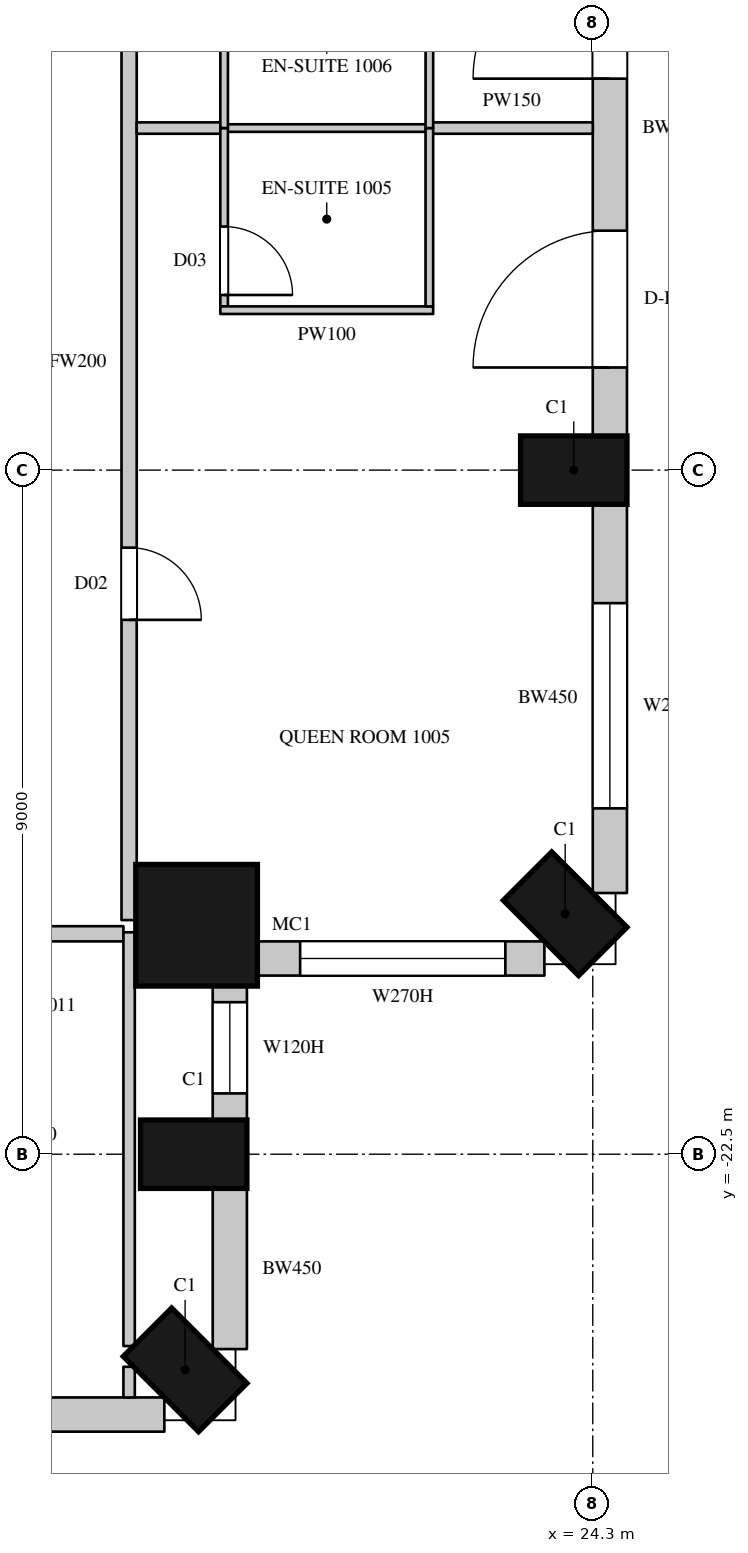
"""IFC4 building model, lengths in metres.
Left out: names, types, materials, properties, quantities, classifications, styles, units other than length and angle.
Written with IfcOpenShell. Run it as: python <this file> out.ifc"""

import sys

from ifc_helpers import new_model, si_unit, direction, frame, frame_2d, origin, origin_2d, place, context, subcontext, project, spatial, rectangle, circle, extrude, element, fill, save


model = new_model("IFC4")
c1 = context("Model", 3, precision=1e-05, world=origin(), true_north=direction((0.0, 1.0)))
c2 = subcontext(c1, "Body", "Model", "MODEL_VIEW")
j1 = project(units=[si_unit("LENGTHUNIT", "METRE"), si_unit("PLANEANGLEUNIT", "RADIAN")], contexts=[c1])
p1 = place(None, origin())
s1 = spatial("IfcSite", under=j1, at=p1, CompositionType="ELEMENT")
p2 = place(p1, origin())
s2 = spatial("IfcBuilding", under=s1, at=p2, CompositionType="ELEMENT")
p3 = place(p2, frame((0.0, 0.0, 66.3)))
s3 = spatial("IfcBuildingStorey", under=s2, at=p3, CompositionType="ELEMENT", Elevation=66.3)
for number, where, z_axis, x_axis in (
    (1, (18.937, -25.337, 0.0), (0.0, 0.0, 1.0), (0.707, 0.707, 0.0)),
    (2, (19.05, -22.5, 0.0), (0.0, 0.0, 1.0), (0.0, 1.0, 0.0)),
):
    element("IfcColumn", number, at=place(p3, frame(where, z_axis=z_axis, x_axis=x_axis)), inside=s3, PredefinedType="COLUMN", context=c2, shape_type="SweptSolid", body=[
        extrude(rectangle(XDim=0.9, YDim=1.4, at=origin_2d()), origin(), (0.0, 0.0, 1.0), 3.6),
    ])
p4 = place(p3, frame((19.088, -19.488, 0.0), z_axis=(0.0, 0.0, 1.0), x_axis=(1.0, 0.0, 0.0)))
e3 = element("IfcColumn", 3, at=p4, inside=s3, PredefinedType="COLUMN", context=c2, shape_type="SweptSolid", body=[
    extrude(circle(Radius=0.8, at=origin_2d()), origin(), (0.0, 0.0, 1.0), 3.6),
])
for number, where, z_axis, x_axis in (
    (4, (23.937, -19.337, 0.0), (0.0, 0.0, 1.0), (0.707, 0.707, 0.0)),
    (5, (24.05, -13.5, 0.0), (0.0, 0.0, 1.0), (0.0, 1.0, 0.0)),
):
    element("IfcColumn", number, at=place(p3, frame(where, z_axis=z_axis, x_axis=x_axis)), inside=s3, PredefinedType="COLUMN", context=c2, shape_type="SweptSolid", body=[
        extrude(rectangle(XDim=0.9, YDim=1.4, at=origin_2d()), origin(), (0.0, 0.0, 1.0), 3.6),
    ])
p5 = place(p3, frame((15.75, -25.925, 0.0), z_axis=(0.0, 0.0, 1.0), x_axis=(1.0, 0.0, 0.0)))
e6 = element("IfcWall", 6, at=p5, inside=s3, PredefinedType="SOLIDWALL", context=c2, shape_type="SweptSolid", body=[
    extrude(rectangle(XDim=2.914, YDim=0.45, at=frame_2d((1.457, 0.0))), origin(), (0.0, 0.0, 1.0), 3.3),
])
p6 = place(p3, frame((19.525, -25.064, 0.0), z_axis=(0.0, 0.0, 1.0), x_axis=(0.0, 1.0, 0.0)))
e7 = element("IfcWall", 7, at=p6, inside=s3, PredefinedType="SOLIDWALL", context=c2, shape_type="SweptSolid", body=[
    extrude(rectangle(XDim=2.114, YDim=0.45, at=frame_2d((1.057, 0.0))), origin(), (0.0, 0.0, 1.0), 3.3),
])
p7 = place(p3, frame((19.525, -22.05, 0.0), z_axis=(0.0, 0.0, 1.0), x_axis=(0.0, 1.0, 0.0)))
e8 = element("IfcWall", 8, at=p7, inside=s3, PredefinedType="SOLIDWALL", context=c2, shape_type="SweptSolid", body=[
    extrude(rectangle(XDim=1.792, YDim=0.45, at=frame_2d((0.896, 0.0))), origin(), (0.0, 0.0, 1.0), 3.3),
])
p8 = place(p7, frame((0.35, 0.0, 1.05)))
e9 = element("IfcOpeningElement", 9, at=p8, cuts=e8, PredefinedType="OPENING", context=c2, shape_type="SweptSolid", body=[
    extrude(rectangle(XDim=1.2, YDim=2.0, at=frame_2d((0.6, 1.0))), frame((0.0, 0.235, 0.0), z_axis=(0.0, -1.0, 0.0), x_axis=(1.0, 0.0, 0.0)), (0.0, 0.0, 1.0), 0.47),
])
p9 = place(p3, frame((19.858, -19.925, 0.0), z_axis=(0.0, 0.0, 1.0), x_axis=(1.0, 0.0, 0.0)))
e10 = element("IfcWall", 10, at=p9, inside=s3, PredefinedType="SOLIDWALL", context=c2, shape_type="SweptSolid", body=[
    extrude(rectangle(XDim=3.805, YDim=0.45, at=frame_2d((1.903, 0.0))), origin(), (0.0, 0.0, 1.0), 3.3),
])
p10 = place(p9, frame((0.592, 0.0, 1.05)))
e11 = element("IfcOpeningElement", 11, at=p10, cuts=e10, PredefinedType="OPENING", context=c2, shape_type="SweptSolid", body=[
    extrude(rectangle(XDim=2.7, YDim=2.0, at=frame_2d((1.35, 1.0))), frame((0.0, 0.235, 0.0), z_axis=(0.0, -1.0, 0.0), x_axis=(1.0, 0.0, 0.0)), (0.0, 0.0, 1.0), 0.47),
])
p11 = place(p3, frame((24.525, -19.064, 0.0), z_axis=(0.0, 0.0, 1.0), x_axis=(0.0, 1.0, 0.0)))
e12 = element("IfcWall", 12, at=p11, inside=s3, PredefinedType="SOLIDWALL", context=c2, shape_type="SweptSolid", body=[
    extrude(rectangle(XDim=5.114, YDim=0.45, at=frame_2d((2.557, 0.0))), origin(), (0.0, 0.0, 1.0), 3.3),
])
p12 = place(p11, frame((1.114, 0.0, 1.05)))
e13 = element("IfcOpeningElement", 13, at=p12, cuts=e12, PredefinedType="OPENING", context=c2, shape_type="SweptSolid", body=[
    extrude(rectangle(XDim=2.7, YDim=2.0, at=frame_2d((1.35, 1.0))), frame((0.0, 0.235, 0.0), z_axis=(0.0, -1.0, 0.0), x_axis=(1.0, 0.0, 0.0)), (0.0, 0.0, 1.0), 0.47),
])
p13 = place(p3, frame((24.525, -13.05, 0.0), z_axis=(0.0, 0.0, 1.0), x_axis=(0.0, 1.0, 0.0)))
e14 = element("IfcWall", 14, at=p13, inside=s3, PredefinedType="SOLIDWALL", context=c2, shape_type="SweptSolid", body=[
    extrude(rectangle(XDim=8.1, YDim=0.45, at=frame_2d((4.05, 0.0))), origin(), (0.0, 0.0, 1.0), 3.3),
])
p14 = place(p13, frame((0.9, 0.0, 0.0)))
e15 = element("IfcOpeningElement", 15, at=p14, cuts=e14, PredefinedType="OPENING", context=c2, shape_type="SweptSolid", body=[
    extrude(rectangle(XDim=1.8, YDim=2.4, at=frame_2d((0.9, 1.2))), frame((0.0, 0.235, 0.0), z_axis=(0.0, -1.0, 0.0), x_axis=(1.0, 0.0, 0.0)), (0.0, 0.0, 1.0), 0.47),
])
p15 = place(p13, frame((4.7, 0.0, 0.0)))
e16 = element("IfcOpeningElement", 16, at=p15, cuts=e14, PredefinedType="OPENING", context=c2, shape_type="SweptSolid", body=[
    extrude(rectangle(XDim=1.8, YDim=2.4, at=frame_2d((0.9, 1.2))), frame((0.0, 0.235, 0.0), z_axis=(0.0, -1.0, 0.0), x_axis=(1.0, 0.0, 0.0)), (0.0, 0.0, 1.0), 0.47),
])
p16 = place(p13, frame((6.7, 0.0, 1.05)))
e17 = element("IfcOpeningElement", 17, at=p16, cuts=e14, PredefinedType="OPENING", context=c2, shape_type="SweptSolid", body=[
    extrude(rectangle(XDim=1.2, YDim=2.0, at=frame_2d((0.6, 1.0))), frame((0.0, 0.235, 0.0), z_axis=(0.0, -1.0, 0.0), x_axis=(1.0, 0.0, 0.0)), (0.0, 0.0, 1.0), 0.47),
])
p17 = place(p3, frame((-20.7, -19.6, 0.0), z_axis=(0.0, 0.0, 1.0), x_axis=(1.0, 0.0, 0.0)))
e18 = element("IfcWall", 18, at=p17, inside=s3, PredefinedType="PARTITIONING", context=c2, shape_type="SweptSolid", body=[
    extrude(rectangle(XDim=38.825, YDim=0.2, at=frame_2d((19.413, 0.0))), origin(), (0.0, 0.0, 1.0), 3.3),
])
p18 = place(p17, frame((3.15, 0.0, 0.0)))
e19 = element("IfcOpeningElement", 19, at=p18, cuts=e18, PredefinedType="OPENING", context=c2, shape_type="SweptSolid", body=[
    extrude(rectangle(XDim=0.95, YDim=2.2, at=frame_2d((0.475, 1.1))), frame((0.0, 0.11, 0.0), z_axis=(0.0, -1.0, 0.0), x_axis=(1.0, 0.0, 0.0)), (0.0, 0.0, 1.0), 0.22),
])
p19 = place(p17, frame((13.9, 0.0, 0.0)))
e20 = element("IfcOpeningElement", 20, at=p19, cuts=e18, PredefinedType="OPENING", context=c2, shape_type="SweptSolid", body=[
    extrude(rectangle(XDim=0.95, YDim=2.2, at=frame_2d((0.475, 1.1))), frame((0.0, 0.11, 0.0), z_axis=(0.0, -1.0, 0.0), x_axis=(1.0, 0.0, 0.0)), (0.0, 0.0, 1.0), 0.22),
])
p20 = place(p17, frame((21.15, 0.0, 0.0)))
e21 = element("IfcOpeningElement", 21, at=p20, cuts=e18, PredefinedType="OPENING", context=c2, shape_type="SweptSolid", body=[
    extrude(rectangle(XDim=0.95, YDim=2.2, at=frame_2d((0.475, 1.1))), frame((0.0, 0.11, 0.0), z_axis=(0.0, -1.0, 0.0), x_axis=(1.0, 0.0, 0.0)), (0.0, 0.0, 1.0), 0.22),
])
p21 = place(p17, frame((29.75, 0.0, 0.0)))
e22 = element("IfcOpeningElement", 22, at=p21, cuts=e18, PredefinedType="OPENING", context=c2, shape_type="SweptSolid", body=[
    extrude(rectangle(XDim=1.1, YDim=2.4, at=frame_2d((0.55, 1.2))), frame((0.0, 0.11, 0.0), z_axis=(0.0, -1.0, 0.0), x_axis=(1.0, 0.0, 0.0)), (0.0, 0.0, 1.0), 0.22),
])
p22 = place(p3, frame((18.2, -19.42, 0.0), z_axis=(0.0, 0.0, 1.0), x_axis=(0.0, 1.0, 0.0)))
e23 = element("IfcWall", 23, at=p22, inside=s3, PredefinedType="PARTITIONING", context=c2, shape_type="SweptSolid", body=[
    extrude(rectangle(XDim=14.67, YDim=0.2, at=frame_2d((7.335, 0.0))), origin(), (0.0, 0.0, 1.0), 3.3),
])
p23 = place(p22, frame((3.95, 0.0, 0.0)))
e24 = element("IfcOpeningElement", 24, at=p23, cuts=e23, PredefinedType="OPENING", context=c2, shape_type="SweptSolid", body=[
    extrude(rectangle(XDim=0.95, YDim=2.2, at=frame_2d((0.475, 1.1))), frame((0.0, 0.11, 0.0), z_axis=(0.0, -1.0, 0.0), x_axis=(1.0, 0.0, 0.0)), (0.0, 0.0, 1.0), 0.22),
])
p24 = place(p22, frame((13.35, 0.0, 0.0)))
e25 = element("IfcOpeningElement", 25, at=p24, cuts=e23, PredefinedType="OPENING", context=c2, shape_type="SweptSolid", body=[
    extrude(rectangle(XDim=0.95, YDim=2.2, at=frame_2d((0.475, 1.1))), frame((0.0, 0.11, 0.0), z_axis=(0.0, -1.0, 0.0), x_axis=(1.0, 0.0, 0.0)), (0.0, 0.0, 1.0), 0.22),
])
p25 = place(p3, frame((18.2, -25.7, 0.0), z_axis=(0.0, 0.0, 1.0), x_axis=(0.0, 1.0, 0.0)))
e26 = element("IfcWall", 26, at=p25, inside=s3, PredefinedType="PARTITIONING", context=c2, shape_type="SweptSolid", body=[
    extrude(rectangle(XDim=0.404, YDim=0.15, at=frame_2d((0.202, 0.0))), origin(), (0.0, 0.0, 1.0), 3.3),
])
p26 = place(p3, frame((18.2, -25.024, 0.0), z_axis=(0.0, 0.0, 1.0), x_axis=(0.0, 1.0, 0.0)))
e27 = element("IfcWall", 27, at=p26, inside=s3, PredefinedType="PARTITIONING", context=c2, shape_type="SweptSolid", body=[
    extrude(rectangle(XDim=5.444, YDim=0.15, at=frame_2d((2.722, 0.0))), origin(), (0.0, 0.0, 1.0), 3.3),
])
p27 = place(p3, frame((18.3, -9.0, 0.0), z_axis=(0.0, 0.0, 1.0), x_axis=(1.0, 0.0, 0.0)))
e28 = element("IfcWall", 28, at=p27, inside=s3, PredefinedType="PARTITIONING", context=c2, shape_type="SweptSolid", body=[
    extrude(rectangle(XDim=1.13, YDim=0.15, at=frame_2d((0.565, 0.0))), origin(), (0.0, 0.0, 1.0), 2.65),
])
p28 = place(p3, frame((22.17, -9.0, 0.0), z_axis=(0.0, 0.0, 1.0), x_axis=(1.0, 0.0, 0.0)))
e29 = element("IfcWall", 29, at=p28, inside=s3, PredefinedType="PARTITIONING", context=c2, shape_type="SweptSolid", body=[
    extrude(rectangle(XDim=2.13, YDim=0.15, at=frame_2d((1.065, 0.0))), origin(), (0.0, 0.0, 1.0), 2.65),
])
p29 = place(p3, frame((19.43, -9.0, 0.0), z_axis=(0.0, 0.0, 1.0), x_axis=(1.0, 0.0, 0.0)))
e30 = element("IfcWall", 30, at=p29, inside=s3, PredefinedType="PARTITIONING", context=c2, shape_type="SweptSolid", body=[
    extrude(rectangle(XDim=2.74, YDim=0.1, at=frame_2d((1.37, 0.0))), origin(), (0.0, 0.0, 1.0), 2.65),
])
p30 = place(p3, frame((19.45, -11.346, 0.0), z_axis=(0.0, 0.0, 1.0), x_axis=(0.0, 1.0, 0.0)))
e31 = element("IfcWall", 31, at=p30, inside=s3, PredefinedType="PARTITIONING", context=c2, shape_type="SweptSolid", body=[
    extrude(rectangle(XDim=2.346, YDim=0.1, at=frame_2d((1.173, 0.0))), origin(), (0.0, 0.0, 1.0), 3.3),
])
p31 = place(p30, frame((0.15, 0.0, 0.0)))
e32 = element("IfcOpeningElement", 32, at=p31, cuts=e31, PredefinedType="OPENING", context=c2, shape_type="SweptSolid", body=[
    extrude(rectangle(XDim=0.9, YDim=2.2, at=frame_2d((0.45, 1.1))), frame((0.0, 0.06, 0.0), z_axis=(0.0, -1.0, 0.0), x_axis=(1.0, 0.0, 0.0)), (0.0, 0.0, 1.0), 0.12),
])
p32 = place(p3, frame((19.4, -11.396, 0.0), z_axis=(0.0, 0.0, 1.0), x_axis=(1.0, 0.0, 0.0)))
e33 = element("IfcWall", 33, at=p32, inside=s3, PredefinedType="PARTITIONING", context=c2, shape_type="SweptSolid", body=[
    extrude(rectangle(XDim=2.8, YDim=0.1, at=frame_2d((1.4, 0.0))), origin(), (0.0, 0.0, 1.0), 3.3),
])
p33 = place(p3, frame((19.45, -9.0, 0.0), z_axis=(0.0, 0.0, 1.0), x_axis=(0.000399241409, 0.999999920303, 0.0)))
e34 = element("IfcWall", 34, at=p33, inside=s3, PredefinedType="PARTITIONING", context=c2, shape_type="SweptSolid", body=[
    extrude(rectangle(XDim=2.446, YDim=0.1, at=frame_2d((1.223, 0.0))), origin(), (0.0, 0.0, 1.0), 3.3),
])
p34 = place(p33, frame((1.3, 0.0, 0.0)))
e35 = element("IfcOpeningElement", 35, at=p34, cuts=e34, PredefinedType="OPENING", context=c2, shape_type="SweptSolid", body=[
    extrude(rectangle(XDim=0.9, YDim=2.2, at=frame_2d((0.45, 1.1))), frame((0.0, 0.06, 0.0), z_axis=(0.0, -1.0, 0.0), x_axis=(1.0, 0.0, 0.0)), (0.0, 0.0, 1.0), 0.12),
])
p35 = place(p3, frame((22.15, -11.346, 0.0), z_axis=(0.0, 0.0, 1.0), x_axis=(0.0, 1.0, 0.0)))
e36 = element("IfcWall", 36, at=p35, inside=s3, PredefinedType="PARTITIONING", context=c2, shape_type="SweptSolid", body=[
    extrude(rectangle(XDim=2.346, YDim=0.1, at=frame_2d((1.173, 0.0))), origin(), (0.0, 0.0, 1.0), 3.3),
])
p36 = place(p3, frame((22.15, -9.0, 0.0), z_axis=(0.0, 0.0, 1.0), x_axis=(0.00041644973, 0.999999913285, 0.0)))
e37 = element("IfcWall", 37, at=p36, inside=s3, PredefinedType="PARTITIONING", context=c2, shape_type="SweptSolid", body=[
    extrude(rectangle(XDim=2.345, YDim=0.1, at=frame_2d((1.172, 0.0))), origin(), (0.0, 0.0, 1.0), 3.3),
])
p37 = place(p8, origin())
e38 = element("IfcWindow", 38, at=p37, inside=s3, PartitioningType="SINGLE_PANEL", PredefinedType="WINDOW", context=c2, shape_type="SweptSolid", body=[
    extrude(rectangle(XDim=1.2, YDim=2.0, at=frame_2d((0.6, 1.0))), frame((0.0, 0.135, 0.0), z_axis=(0.0, -1.0, 0.0), x_axis=(1.0, 0.0, 0.0)), (0.0, 0.0, 1.0), 0.06),
])
fill(e9, e38)
p38 = place(p10, origin())
e39 = element("IfcWindow", 39, at=p38, inside=s3, PartitioningType="SINGLE_PANEL", PredefinedType="WINDOW", context=c2, shape_type="SweptSolid", body=[
    extrude(rectangle(XDim=2.7, YDim=2.0, at=frame_2d((1.35, 1.0))), frame((0.0, 0.135, 0.0), z_axis=(0.0, -1.0, 0.0), x_axis=(1.0, 0.0, 0.0)), (0.0, 0.0, 1.0), 0.06),
])
fill(e11, e39)
p39 = place(p12, origin())
e40 = element("IfcWindow", 40, at=p39, inside=s3, PartitioningType="SINGLE_PANEL", PredefinedType="WINDOW", context=c2, shape_type="SweptSolid", body=[
    extrude(rectangle(XDim=2.7, YDim=2.0, at=frame_2d((1.35, 1.0))), frame((0.0, 0.135, 0.0), z_axis=(0.0, -1.0, 0.0), x_axis=(1.0, 0.0, 0.0)), (0.0, 0.0, 1.0), 0.06),
])
fill(e13, e40)
p40 = place(p14, origin())
e41 = element("IfcDoor", 41, at=p40, inside=s3, OperationType="SLIDING_TO_LEFT", PredefinedType="DOOR", context=c2, shape_type="SweptSolid", body=[
    extrude(rectangle(XDim=1.8, YDim=2.4, at=frame_2d((0.9, 1.2))), frame((0.0, 0.13, 0.0), z_axis=(0.0, -1.0, 0.0), x_axis=(1.0, 0.0, 0.0)), (0.0, 0.0, 1.0), 0.05),
])
fill(e15, e41)
p41 = place(p15, origin())
e42 = element("IfcDoor", 42, at=p41, inside=s3, OperationType="SLIDING_TO_LEFT", PredefinedType="DOOR", context=c2, shape_type="SweptSolid", body=[
    extrude(rectangle(XDim=1.8, YDim=2.4, at=frame_2d((0.9, 1.2))), frame((0.0, 0.13, 0.0), z_axis=(0.0, -1.0, 0.0), x_axis=(1.0, 0.0, 0.0)), (0.0, 0.0, 1.0), 0.05),
])
fill(e16, e42)
p42 = place(p23, origin())
e43 = element("IfcDoor", 43, at=p42, inside=s3, OperationType="SINGLE_SWING_RIGHT", PredefinedType="DOOR", context=c2, shape_type="SweptSolid", body=[
    extrude(rectangle(XDim=0.95, YDim=2.2, at=frame_2d((0.475, 1.1))), frame((0.0, 0.025, 0.0), z_axis=(0.0, -1.0, 0.0), x_axis=(1.0, 0.0, 0.0)), (0.0, 0.0, 1.0), 0.05),
])
fill(e24, e43)
p43 = place(p31, origin())
e44 = element("IfcDoor", 44, at=p43, inside=s3, OperationType="SINGLE_SWING_RIGHT", PredefinedType="DOOR", context=c2, shape_type="SweptSolid", body=[
    extrude(rectangle(XDim=0.9, YDim=2.2, at=frame_2d((0.45, 1.1))), frame((0.0, 0.025, 0.0), z_axis=(0.0, -1.0, 0.0), x_axis=(1.0, 0.0, 0.0)), (0.0, 0.0, 1.0), 0.05),
])
fill(e32, e44)
save(model, sys.argv[1])
